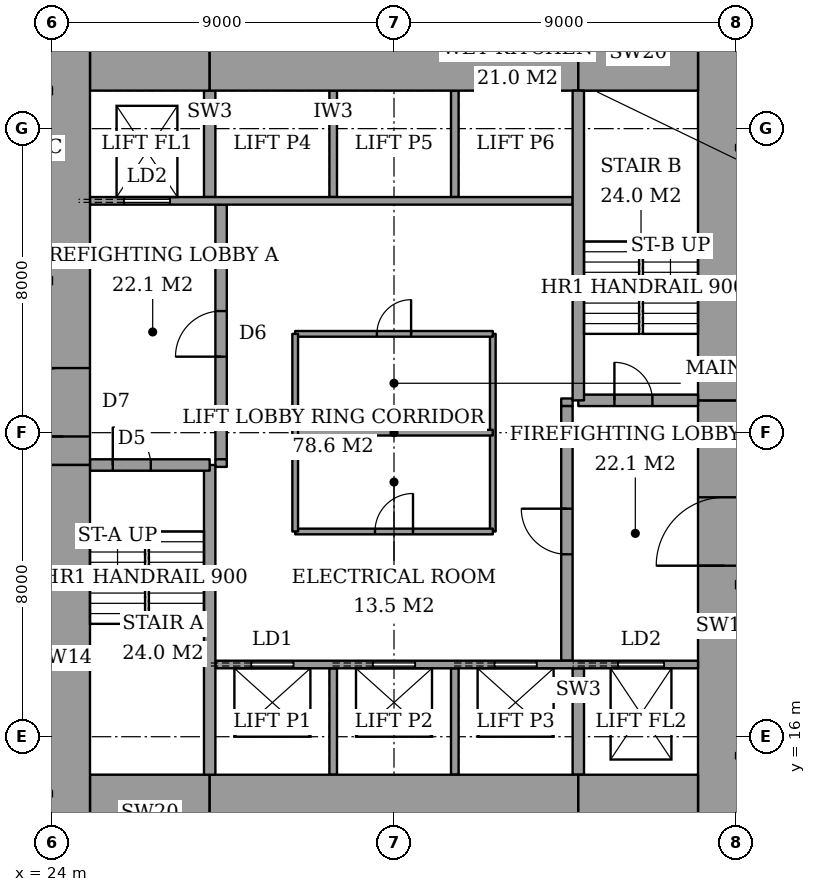
"""IFC4 building model, lengths in metres.
Left out: names, types, materials, properties, quantities, classifications, styles, units other than length and angle.
Written with IfcOpenShell. Run it as: python <this file> out.ifc"""

import sys

from ifc_helpers import new_model, si_unit, direction, frame, frame_2d, origin, place, context, subcontext, project, spatial, rectangle, extrude, element, fill, save


model = new_model("IFC4")
c1 = context("Model", 3, precision=1e-05, world=origin(), true_north=direction((0.0, 1.0)))
c2 = subcontext(c1, "Body", "Model", "MODEL_VIEW")
j1 = project(units=[si_unit("LENGTHUNIT", "METRE"), si_unit("PLANEANGLEUNIT", "RADIAN")], contexts=[c1])
p1 = place(None, origin())
s1 = spatial("IfcSite", under=j1, at=p1, CompositionType="ELEMENT")
p2 = place(p1, origin())
s2 = spatial("IfcBuilding", under=s1, at=p2, CompositionType="ELEMENT")
p3 = place(p2, frame((0.0, 0.0, 29.6)))
s3 = spatial("IfcBuildingStorey", under=s2, at=p3, CompositionType="ELEMENT", Elevation=29.6)
p4 = place(p3, frame((25.0, 14.0, 0.0), z_axis=(0.0, 0.0, 1.0), x_axis=(1.0, 0.0, 0.0)))
e1 = element("IfcWall", 1, at=p4, inside=s3, PredefinedType="SHEAR", context=c2, shape_type="SweptSolid", body=[
    extrude(rectangle(XDim=3.15, YDim=2.0, at=frame_2d((1.575, 0.0))), origin(), (0.0, 0.0, 1.0), 3.6),
])
p5 = place(p3, frame((28.15, 14.0, 0.0), z_axis=(0.0, 0.0, 1.0), x_axis=(1.0, 0.0, 0.0)))
e2 = element("IfcWall", 2, at=p5, inside=s3, PredefinedType="SHEAR", context=c2, shape_type="SweptSolid", body=[
    extrude(rectangle(XDim=9.7, YDim=2.0, at=frame_2d((4.85, 0.0))), origin(), (0.0, 0.0, 1.0), 3.6),
])
for number, where, z_axis, x_axis in (
    (3, (37.85, 14.0, 0.0), (0.0, 0.0, 1.0), (1.0, 0.0, 0.0)),
    (4, (25.0, 34.0, 0.0), (0.0, 0.0, 1.0), (1.0, 0.0, 0.0)),
):
    element("IfcWall", number, at=place(p3, frame(where, z_axis=z_axis, x_axis=x_axis)), inside=s3, PredefinedType="SHEAR", context=c2, shape_type="SweptSolid", body=[
        extrude(rectangle(XDim=3.15, YDim=2.0, at=frame_2d((1.575, 0.0))), origin(), (0.0, 0.0, 1.0), 3.6),
    ])
p6 = place(p3, frame((28.15, 34.0, 0.0), z_axis=(0.0, 0.0, 1.0), x_axis=(1.0, 0.0, 0.0)))
e5 = element("IfcWall", 5, at=p6, inside=s3, PredefinedType="SHEAR", context=c2, shape_type="SweptSolid", body=[
    extrude(rectangle(XDim=9.7, YDim=2.0, at=frame_2d((4.85, 0.0))), origin(), (0.0, 0.0, 1.0), 3.6),
])
p7 = place(p3, frame((37.85, 34.0, 0.0), z_axis=(0.0, 0.0, 1.0), x_axis=(1.0, 0.0, 0.0)))
e6 = element("IfcWall", 6, at=p7, inside=s3, PredefinedType="SHEAR", context=c2, shape_type="SweptSolid", body=[
    extrude(rectangle(XDim=3.15, YDim=2.0, at=frame_2d((1.575, 0.0))), origin(), (0.0, 0.0, 1.0), 3.6),
])
p8 = place(p3, frame((24.3, 13.0, 0.0), z_axis=(0.0, 0.0, 1.0), x_axis=(0.0, 1.0, 0.0)))
e7 = element("IfcWall", 7, at=p8, inside=s3, PredefinedType="SHEAR", context=c2, shape_type="SweptSolid", body=[
    extrude(rectangle(XDim=10.15, YDim=1.4, at=frame_2d((5.075, 0.0))), origin(), (0.0, 0.0, 1.0), 3.6),
])
p9 = place(p3, frame((24.3, 23.15, 0.0), z_axis=(0.0, 0.0, 1.0), x_axis=(0.0, 1.0, 0.0)))
e8 = element("IfcWall", 8, at=p9, inside=s3, PredefinedType="SHEAR", context=c2, shape_type="SweptSolid", body=[
    extrude(rectangle(XDim=11.85, YDim=1.4, at=frame_2d((5.925, 0.0))), origin(), (0.0, 0.0, 1.0), 3.6),
])
p10 = place(p9, frame((0.75, 0.0, 0.0)))
e9 = element("IfcOpeningElement", 9, at=p10, cuts=e8, PredefinedType="OPENING", context=c2, shape_type="SweptSolid", body=[
    extrude(rectangle(XDim=1.8, YDim=2.4, at=frame_2d((0.9, 1.2))), frame((0.0, 0.71, 0.0), z_axis=(0.0, -1.0, 0.0), x_axis=(1.0, 0.0, 0.0)), (0.0, 0.0, 1.0), 1.42),
])
p11 = place(p3, frame((41.7, 13.0, 0.0), z_axis=(0.0, 0.0, 1.0), x_axis=(0.0, 1.0, 0.0)))
e10 = element("IfcWall", 10, at=p11, inside=s3, PredefinedType="SHEAR", context=c2, shape_type="SweptSolid", body=[
    extrude(rectangle(XDim=11.85, YDim=1.4, at=frame_2d((5.925, 0.0))), origin(), (0.0, 0.0, 1.0), 3.6),
])
p12 = place(p11, frame((7.5, 0.0, 0.0)))
e11 = element("IfcOpeningElement", 11, at=p12, cuts=e10, PredefinedType="OPENING", context=c2, shape_type="SweptSolid", body=[
    extrude(rectangle(XDim=1.8, YDim=2.4, at=frame_2d((0.9, 1.2))), frame((0.0, 0.71, 0.0), z_axis=(0.0, -1.0, 0.0), x_axis=(1.0, 0.0, 0.0)), (0.0, 0.0, 1.0), 1.42),
])
p13 = place(p3, frame((41.7, 24.85, 0.0), z_axis=(0.0, 0.0, 1.0), x_axis=(0.0, 1.0, 0.0)))
e12 = element("IfcWall", 12, at=p13, inside=s3, PredefinedType="SHEAR", context=c2, shape_type="SweptSolid", body=[
    extrude(rectangle(XDim=10.15, YDim=1.4, at=frame_2d((5.075, 0.0))), origin(), (0.0, 0.0, 1.0), 3.6),
])
p14 = place(p3, frame((28.15, 15.0, 0.0), z_axis=(0.0, 0.0, 1.0), x_axis=(0.0, 1.0, 0.0)))
e13 = element("IfcWall", 13, at=p14, inside=s3, PredefinedType="SHEAR", context=c2, shape_type="SweptSolid", body=[
    extrude(rectangle(XDim=8.15, YDim=0.3, at=frame_2d((4.075, 0.0))), origin(), (0.0, 0.0, 1.0), 3.6),
])
p15 = place(p3, frame((25.0, 23.15, 0.0), z_axis=(0.0, 0.0, 1.0), x_axis=(1.0, 0.0, 0.0)))
e14 = element("IfcWall", 14, at=p15, inside=s3, PredefinedType="SHEAR", context=c2, shape_type="SweptSolid", body=[
    extrude(rectangle(XDim=3.15, YDim=0.3, at=frame_2d((1.575, 0.0))), origin(), (0.0, 0.0, 1.0), 3.6),
])
p16 = place(p15, frame((0.6, 0.0, 0.0)))
e15 = element("IfcOpeningElement", 15, at=p16, cuts=e14, PredefinedType="OPENING", context=c2, shape_type="SweptSolid", body=[
    extrude(rectangle(XDim=1.0, YDim=2.1, at=frame_2d((0.5, 1.05))), frame((0.0, 0.16, 0.0), z_axis=(0.0, -1.0, 0.0), x_axis=(1.0, 0.0, 0.0)), (0.0, 0.0, 1.0), 0.32),
])
p17 = place(p3, frame((37.85, 24.85, 0.0), z_axis=(0.0, 0.0, 1.0), x_axis=(0.0, 1.0, 0.0)))
e16 = element("IfcWall", 16, at=p17, inside=s3, PredefinedType="SHEAR", context=c2, shape_type="SweptSolid", body=[
    extrude(rectangle(XDim=8.15, YDim=0.3, at=frame_2d((4.075, 0.0))), origin(), (0.0, 0.0, 1.0), 3.6),
])
p18 = place(p3, frame((37.85, 24.85, 0.0), z_axis=(0.0, 0.0, 1.0), x_axis=(1.0, 0.0, 0.0)))
e17 = element("IfcWall", 17, at=p18, inside=s3, PredefinedType="SHEAR", context=c2, shape_type="SweptSolid", body=[
    extrude(rectangle(XDim=3.15, YDim=0.3, at=frame_2d((1.575, 0.0))), origin(), (0.0, 0.0, 1.0), 3.6),
])
p19 = place(p18, frame((0.95, 0.0, 0.0)))
e18 = element("IfcOpeningElement", 18, at=p19, cuts=e17, PredefinedType="OPENING", context=c2, shape_type="SweptSolid", body=[
    extrude(rectangle(XDim=1.0, YDim=2.1, at=frame_2d((0.5, 1.05))), frame((0.0, 0.16, 0.0), z_axis=(0.0, -1.0, 0.0), x_axis=(1.0, 0.0, 0.0)), (0.0, 0.0, 1.0), 0.32),
])
p20 = place(p3, frame((28.45, 23.3, 0.0), z_axis=(0.0, 0.0, 1.0), x_axis=(0.0, 1.0, 0.0)))
e19 = element("IfcWall", 19, at=p20, inside=s3, PredefinedType="PARTITIONING", context=c2, shape_type="SweptSolid", body=[
    extrude(rectangle(XDim=6.7, YDim=0.3, at=frame_2d((3.35, 0.0))), origin(), (0.0, 0.0, 1.0), 3.6),
])
p21 = place(p20, frame((2.7, 0.0, 0.0)))
e20 = element("IfcOpeningElement", 20, at=p21, cuts=e19, PredefinedType="OPENING", context=c2, shape_type="SweptSolid", body=[
    extrude(rectangle(XDim=1.2, YDim=2.1, at=frame_2d((0.6, 1.05))), frame((0.0, 0.16, 0.0), z_axis=(0.0, -1.0, 0.0), x_axis=(1.0, 0.0, 0.0)), (0.0, 0.0, 1.0), 0.32),
])
p22 = place(p3, frame((37.55, 18.0, 0.0), z_axis=(0.0, 0.0, 1.0), x_axis=(0.0, 1.0, 0.0)))
e21 = element("IfcWall", 21, at=p22, inside=s3, PredefinedType="PARTITIONING", context=c2, shape_type="SweptSolid", body=[
    extrude(rectangle(XDim=6.7, YDim=0.3, at=frame_2d((3.35, 0.0))), origin(), (0.0, 0.0, 1.0), 3.6),
])
p23 = place(p22, frame((2.8, 0.0, 0.0)))
e22 = element("IfcOpeningElement", 22, at=p23, cuts=e21, PredefinedType="OPENING", context=c2, shape_type="SweptSolid", body=[
    extrude(rectangle(XDim=1.2, YDim=2.1, at=frame_2d((0.6, 1.05))), frame((0.0, 0.16, 0.0), z_axis=(0.0, -1.0, 0.0), x_axis=(1.0, 0.0, 0.0)), (0.0, 0.0, 1.0), 0.32),
])
p24 = place(p3, frame((28.3, 17.9, 0.0), z_axis=(0.0, 0.0, 1.0), x_axis=(1.0, 0.0, 0.0)))
e23 = element("IfcWall", 23, at=p24, inside=s3, PredefinedType="PARTITIONING", context=c2, shape_type="SweptSolid", body=[
    extrude(rectangle(XDim=12.7, YDim=0.2, at=frame_2d((6.35, 0.0))), origin(), (0.0, 0.0, 1.0), 3.6),
])
p25 = place(p24, frame((0.95, 0.0, 0.0)))
e24 = element("IfcOpeningElement", 24, at=p25, cuts=e23, PredefinedType="OPENING", context=c2, shape_type="SweptSolid", body=[
    extrude(rectangle(XDim=1.1, YDim=2.1, at=frame_2d((0.55, 1.05))), frame((0.0, 0.11, 0.0), z_axis=(0.0, -1.0, 0.0), x_axis=(1.0, 0.0, 0.0)), (0.0, 0.0, 1.0), 0.22),
])
p26 = place(p24, frame((4.15, 0.0, 0.0)))
e25 = element("IfcOpeningElement", 25, at=p26, cuts=e23, PredefinedType="OPENING", context=c2, shape_type="SweptSolid", body=[
    extrude(rectangle(XDim=1.1, YDim=2.1, at=frame_2d((0.55, 1.05))), frame((0.0, 0.11, 0.0), z_axis=(0.0, -1.0, 0.0), x_axis=(1.0, 0.0, 0.0)), (0.0, 0.0, 1.0), 0.22),
])
p27 = place(p24, frame((7.35, 0.0, 0.0)))
e26 = element("IfcOpeningElement", 26, at=p27, cuts=e23, PredefinedType="OPENING", context=c2, shape_type="SweptSolid", body=[
    extrude(rectangle(XDim=1.1, YDim=2.1, at=frame_2d((0.55, 1.05))), frame((0.0, 0.11, 0.0), z_axis=(0.0, -1.0, 0.0), x_axis=(1.0, 0.0, 0.0)), (0.0, 0.0, 1.0), 0.22),
])
p28 = place(p24, frame((10.6, 0.0, 0.0)))
e27 = element("IfcOpeningElement", 27, at=p28, cuts=e23, PredefinedType="OPENING", context=c2, shape_type="SweptSolid", body=[
    extrude(rectangle(XDim=1.2, YDim=2.1, at=frame_2d((0.6, 1.05))), frame((0.0, 0.11, 0.0), z_axis=(0.0, -1.0, 0.0), x_axis=(1.0, 0.0, 0.0)), (0.0, 0.0, 1.0), 0.22),
])
p29 = place(p3, frame((25.0, 30.1, 0.0), z_axis=(0.0, 0.0, 1.0), x_axis=(1.0, 0.0, 0.0)))
e28 = element("IfcWall", 28, at=p29, inside=s3, PredefinedType="PARTITIONING", context=c2, shape_type="SweptSolid", body=[
    extrude(rectangle(XDim=12.7, YDim=0.2, at=frame_2d((6.35, 0.0))), origin(), (0.0, 0.0, 1.0), 3.6),
])
p30 = place(p29, frame((0.9, 0.0, 0.0)))
e29 = element("IfcOpeningElement", 29, at=p30, cuts=e28, PredefinedType="OPENING", context=c2, shape_type="SweptSolid", body=[
    extrude(rectangle(XDim=1.2, YDim=2.1, at=frame_2d((0.6, 1.05))), frame((0.0, 0.11, 0.0), z_axis=(0.0, -1.0, 0.0), x_axis=(1.0, 0.0, 0.0)), (0.0, 0.0, 1.0), 0.22),
])
for number, where, z_axis, x_axis in (
    (30, (31.4, 15.0, 0.0), (0.0, 0.0, 1.0), (0.0, 1.0, 0.0)),
    (31, (34.6, 15.0, 0.0), (0.0, 0.0, 1.0), (0.0, 1.0, 0.0)),
):
    element("IfcWall", number, at=place(p3, frame(where, z_axis=z_axis, x_axis=x_axis)), inside=s3, PredefinedType="PARTITIONING", context=c2, shape_type="SweptSolid", body=[
        extrude(rectangle(XDim=2.8, YDim=0.2, at=frame_2d((1.4, 0.0))), origin(), (0.0, 0.0, 1.0), 3.6),
    ])
p31 = place(p3, frame((37.85, 15.0, 0.0), z_axis=(0.0, 0.0, 1.0), x_axis=(0.0, 1.0, 0.0)))
e32 = element("IfcWall", 32, at=p31, inside=s3, PredefinedType="SHEAR", context=c2, shape_type="SweptSolid", body=[
    extrude(rectangle(XDim=2.8, YDim=0.3, at=frame_2d((1.4, 0.0))), origin(), (0.0, 0.0, 1.0), 3.6),
])
for number, where, z_axis, x_axis in (
    (33, (31.4, 30.2, 0.0), (0.0, 0.0, 1.0), (0.0, 1.0, 0.0)),
    (34, (34.6, 30.2, 0.0), (0.0, 0.0, 1.0), (0.0, 1.0, 0.0)),
):
    element("IfcWall", number, at=place(p3, frame(where, z_axis=z_axis, x_axis=x_axis)), inside=s3, PredefinedType="PARTITIONING", context=c2, shape_type="SweptSolid", body=[
        extrude(rectangle(XDim=2.8, YDim=0.2, at=frame_2d((1.4, 0.0))), origin(), (0.0, 0.0, 1.0), 3.6),
    ])
p32 = place(p3, frame((28.15, 30.2, 0.0), z_axis=(0.0, 0.0, 1.0), x_axis=(0.0, 1.0, 0.0)))
e35 = element("IfcWall", 35, at=p32, inside=s3, PredefinedType="SHEAR", context=c2, shape_type="SweptSolid", body=[
    extrude(rectangle(XDim=2.8, YDim=0.3, at=frame_2d((1.4, 0.0))), origin(), (0.0, 0.0, 1.0), 3.6),
])
for number, where, z_axis, x_axis in (
    (36, (28.3, 23.2, 0.0), (0.0, 0.0, 1.0), (1.0, 0.0, 0.0)),
    (37, (37.4, 24.8, 0.0), (0.0, 0.0, 1.0), (1.0, 0.0, 0.0)),
):
    element("IfcWall", number, at=place(p3, frame(where, z_axis=z_axis, x_axis=x_axis)), inside=s3, PredefinedType="PARTITIONING", context=c2, shape_type="SweptSolid", body=[
        extrude(rectangle(XDim=0.3, YDim=0.2, at=frame_2d((0.15, 0.0))), origin(), (0.0, 0.0, 1.0), 3.6),
    ])
p33 = place(p3, frame((30.4, 21.4, 0.0), z_axis=(0.0, 0.0, 1.0), x_axis=(1.0, 0.0, 0.0)))
e38 = element("IfcWall", 38, at=p33, inside=s3, PredefinedType="PARTITIONING", context=c2, shape_type="SweptSolid", body=[
    extrude(rectangle(XDim=5.2, YDim=0.15, at=frame_2d((2.6, 0.0))), origin(), (0.0, 0.0, 1.0), 3.35),
])
p34 = place(p33, frame((2.1, 0.0, 0.0)))
e39 = element("IfcOpeningElement", 39, at=p34, cuts=e38, PredefinedType="OPENING", context=c2, shape_type="SweptSolid", body=[
    extrude(rectangle(XDim=1.0, YDim=2.1, at=frame_2d((0.5, 1.05))), frame((0.0, 0.085, 0.0), z_axis=(0.0, -1.0, 0.0), x_axis=(1.0, 0.0, 0.0)), (0.0, 0.0, 1.0), 0.17),
])
p35 = place(p3, frame((30.4, 26.6, 0.0), z_axis=(0.0, 0.0, 1.0), x_axis=(1.0, 0.0, 0.0)))
e40 = element("IfcWall", 40, at=p35, inside=s3, PredefinedType="PARTITIONING", context=c2, shape_type="SweptSolid", body=[
    extrude(rectangle(XDim=5.2, YDim=0.15, at=frame_2d((2.6, 0.0))), origin(), (0.0, 0.0, 1.0), 3.35),
])
p36 = place(p35, frame((2.15, 0.0, 0.0)))
e41 = element("IfcOpeningElement", 41, at=p36, cuts=e40, PredefinedType="OPENING", context=c2, shape_type="SweptSolid", body=[
    extrude(rectangle(XDim=0.9, YDim=2.1, at=frame_2d((0.45, 1.05))), frame((0.0, 0.085, 0.0), z_axis=(0.0, -1.0, 0.0), x_axis=(1.0, 0.0, 0.0)), (0.0, 0.0, 1.0), 0.17),
])
for number, where, z_axis, x_axis in (
    (42, (30.4, 21.4, 0.0), (0.0, 0.0, 1.0), (0.0, 1.0, 0.0)),
    (43, (35.6, 21.4, 0.0), (0.0, 0.0, 1.0), (0.0, 1.0, 0.0)),
    (44, (30.4, 24.0, 0.0), (0.0, 0.0, 1.0), (1.0, 0.0, 0.0)),
):
    element("IfcWall", number, at=place(p3, frame(where, z_axis=z_axis, x_axis=x_axis)), inside=s3, PredefinedType="PARTITIONING", context=c2, shape_type="SweptSolid", body=[
        extrude(rectangle(XDim=5.2, YDim=0.15, at=frame_2d((2.6, 0.0))), origin(), (0.0, 0.0, 1.0), 3.35),
    ])
p37 = place(p16, origin())
e45 = element("IfcDoor", 45, at=p37, inside=s3, OperationType="SINGLE_SWING_RIGHT", PredefinedType="DOOR", context=c2, shape_type="SweptSolid", body=[
    extrude(rectangle(XDim=1.0, YDim=2.1, at=frame_2d((0.5, 1.05))), frame((0.0, 0.025, 0.0), z_axis=(0.0, -1.0, 0.0), x_axis=(1.0, 0.0, 0.0)), (0.0, 0.0, 1.0), 0.05),
])
fill(e15, e45)
p38 = place(p19, origin())
e46 = element("IfcDoor", 46, at=p38, inside=s3, OperationType="SINGLE_SWING_RIGHT", PredefinedType="DOOR", context=c2, shape_type="SweptSolid", body=[
    extrude(rectangle(XDim=1.0, YDim=2.1, at=frame_2d((0.5, 1.05))), frame((0.0, 0.025, 0.0), z_axis=(0.0, -1.0, 0.0), x_axis=(1.0, 0.0, 0.0)), (0.0, 0.0, 1.0), 0.05),
])
fill(e18, e46)
p39 = place(p21, origin())
e47 = element("IfcDoor", 47, at=p39, inside=s3, OperationType="SINGLE_SWING_RIGHT", PredefinedType="DOOR", context=c2, shape_type="SweptSolid", body=[
    extrude(rectangle(XDim=1.2, YDim=2.1, at=frame_2d((0.6, 1.05))), frame((0.0, 0.025, 0.0), z_axis=(0.0, -1.0, 0.0), x_axis=(1.0, 0.0, 0.0)), (0.0, 0.0, 1.0), 0.05),
])
fill(e20, e47)
p40 = place(p23, origin())
e48 = element("IfcDoor", 48, at=p40, inside=s3, OperationType="SINGLE_SWING_LEFT", PredefinedType="DOOR", context=c2, shape_type="SweptSolid", body=[
    extrude(rectangle(XDim=1.2, YDim=2.1, at=frame_2d((0.6, 1.05))), frame((0.0, 0.025, 0.0), z_axis=(0.0, -1.0, 0.0), x_axis=(1.0, 0.0, 0.0)), (0.0, 0.0, 1.0), 0.05),
])
fill(e22, e48)
p41 = place(p10, origin())
e49 = element("IfcDoor", 49, at=p41, inside=s3, OperationType="DOUBLE_DOOR_DOUBLE_SWING", PredefinedType="DOOR", context=c2, shape_type="SweptSolid", body=[
    extrude(rectangle(XDim=1.8, YDim=2.4, at=frame_2d((0.9, 1.2))), frame((0.0, 0.025, 0.0), z_axis=(0.0, -1.0, 0.0), x_axis=(1.0, 0.0, 0.0)), (0.0, 0.0, 1.0), 0.05),
])
fill(e9, e49)
p42 = place(p12, origin())
e50 = element("IfcDoor", 50, at=p42, inside=s3, OperationType="DOUBLE_DOOR_DOUBLE_SWING", PredefinedType="DOOR", context=c2, shape_type="SweptSolid", body=[
    extrude(rectangle(XDim=1.8, YDim=2.4, at=frame_2d((0.9, 1.2))), frame((0.0, 0.025, 0.0), z_axis=(0.0, -1.0, 0.0), x_axis=(1.0, 0.0, 0.0)), (0.0, 0.0, 1.0), 0.05),
])
fill(e11, e50)
p43 = place(p34, origin())
e51 = element("IfcDoor", 51, at=p43, inside=s3, OperationType="SINGLE_SWING_LEFT", PredefinedType="DOOR", context=c2, shape_type="SweptSolid", body=[
    extrude(rectangle(XDim=1.0, YDim=2.1, at=frame_2d((0.5, 1.05))), frame((0.0, 0.025, 0.0), z_axis=(0.0, -1.0, 0.0), x_axis=(1.0, 0.0, 0.0)), (0.0, 0.0, 1.0), 0.05),
])
fill(e39, e51)
p44 = place(p36, origin())
e52 = element("IfcDoor", 52, at=p44, inside=s3, OperationType="SINGLE_SWING_LEFT", PredefinedType="DOOR", context=c2, shape_type="SweptSolid", body=[
    extrude(rectangle(XDim=0.9, YDim=2.1, at=frame_2d((0.45, 1.05))), frame((0.0, 0.025, 0.0), z_axis=(0.0, -1.0, 0.0), x_axis=(1.0, 0.0, 0.0)), (0.0, 0.0, 1.0), 0.05),
])
fill(e41, e52)
p45 = place(p25, origin())
e53 = element("IfcDoor", 53, at=p45, inside=s3, OperationType="SLIDING_TO_LEFT", PredefinedType="DOOR", context=c2, shape_type="SweptSolid", body=[
    extrude(rectangle(XDim=1.1, YDim=2.1, at=frame_2d((0.55, 1.05))), frame((0.0, 0.025, 0.0), z_axis=(0.0, -1.0, 0.0), x_axis=(1.0, 0.0, 0.0)), (0.0, 0.0, 1.0), 0.05),
])
fill(e24, e53)
p46 = place(p26, origin())
e54 = element("IfcDoor", 54, at=p46, inside=s3, OperationType="SLIDING_TO_LEFT", PredefinedType="DOOR", context=c2, shape_type="SweptSolid", body=[
    extrude(rectangle(XDim=1.1, YDim=2.1, at=frame_2d((0.55, 1.05))), frame((0.0, 0.025, 0.0), z_axis=(0.0, -1.0, 0.0), x_axis=(1.0, 0.0, 0.0)), (0.0, 0.0, 1.0), 0.05),
])
fill(e25, e54)
p47 = place(p27, origin())
e55 = element("IfcDoor", 55, at=p47, inside=s3, OperationType="SLIDING_TO_LEFT", PredefinedType="DOOR", context=c2, shape_type="SweptSolid", body=[
    extrude(rectangle(XDim=1.1, YDim=2.1, at=frame_2d((0.55, 1.05))), frame((0.0, 0.025, 0.0), z_axis=(0.0, -1.0, 0.0), x_axis=(1.0, 0.0, 0.0)), (0.0, 0.0, 1.0), 0.05),
])
fill(e26, e55)
p48 = place(p30, origin())
e56 = element("IfcDoor", 56, at=p48, inside=s3, OperationType="SLIDING_TO_LEFT", PredefinedType="DOOR", context=c2, shape_type="SweptSolid", body=[
    extrude(rectangle(XDim=1.2, YDim=2.1, at=frame_2d((0.6, 1.05))), frame((0.0, 0.025, 0.0), z_axis=(0.0, -1.0, 0.0), x_axis=(1.0, 0.0, 0.0)), (0.0, 0.0, 1.0), 0.05),
])
fill(e29, e56)
p49 = place(p28, origin())
e57 = element("IfcDoor", 57, at=p49, inside=s3, OperationType="SLIDING_TO_LEFT", PredefinedType="DOOR", context=c2, shape_type="SweptSolid", body=[
    extrude(rectangle(XDim=1.2, YDim=2.1, at=frame_2d((0.6, 1.05))), frame((0.0, 0.025, 0.0), z_axis=(0.0, -1.0, 0.0), x_axis=(1.0, 0.0, 0.0)), (0.0, 0.0, 1.0), 0.05),
])
fill(e27, e57)
save(model, sys.argv[1])
